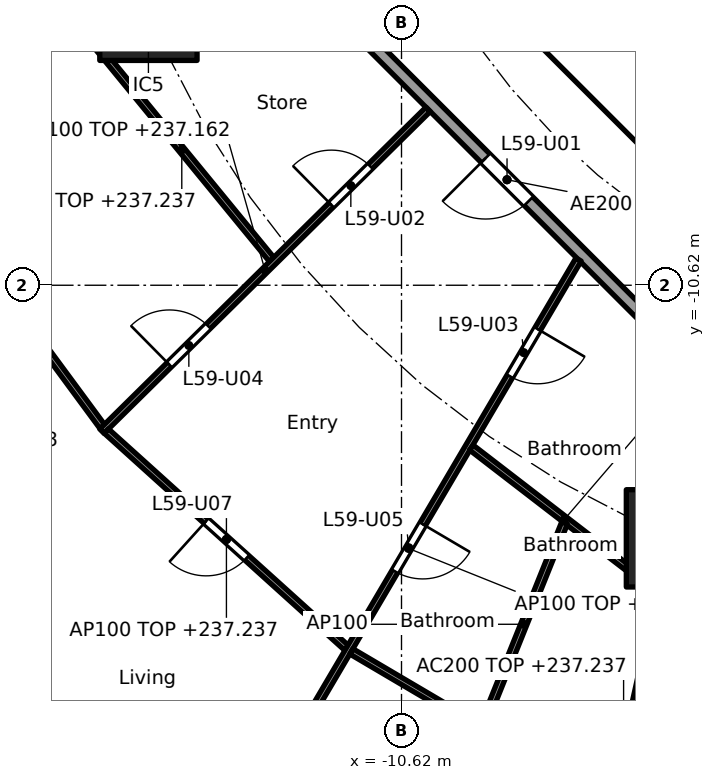
"""IFC4 building model, lengths in metres.
Left out: names, types, materials, properties, quantities, classifications, styles, units other than length and angle.
Written with IfcOpenShell. Run it as: python <this file> out.ifc"""

import sys

from ifc_helpers import new_model, si_unit, direction, frame, frame_2d, origin, origin_2d, place, context, subcontext, project, spatial, rectangle, extrude, element, fill, save


model = new_model("IFC4")
c1 = context("Model", 3, precision=1e-05, world=origin(), true_north=direction((0.0, 1.0)))
c2 = subcontext(c1, "Body", "Model", "MODEL_VIEW")
j1 = project(units=[si_unit("LENGTHUNIT", "METRE"), si_unit("PLANEANGLEUNIT", "RADIAN")], contexts=[c1])
p1 = place(None, origin())
s1 = spatial("IfcSite", under=j1, at=p1, CompositionType="ELEMENT")
p2 = place(p1, origin())
s2 = spatial("IfcBuilding", under=s1, at=p2, CompositionType="ELEMENT")
p3 = place(p2, frame((0.0, 0.0, 234.4)))
s3 = spatial("IfcBuildingStorey", under=s2, at=p3, CompositionType="ELEMENT", Elevation=234.4)
for number, where, z_axis, x_axis in (
    (1, (-14.782, -6.123, 0.0), (0.0, 0.0, 1.0), (1.0, 0.0, 0.0)),
    (2, (-6.123, -14.782, 0.0), (0.0, 0.0, 1.0), (1.0, 0.0, 0.0)),
):
    element("IfcColumn", number, at=place(p3, frame(where, z_axis=z_axis, x_axis=x_axis)), inside=s3, PredefinedType="COLUMN", context=c2, shape_type="SweptSolid", body=[
        extrude(rectangle(XDim=1.6, YDim=1.6, at=origin_2d()), origin(), (0.0, 0.0, 1.0), 3.7),
    ])
p4 = place(p3, frame((-9.988, -4.613, 0.0), z_axis=(0.0, 0.0, 1.0), x_axis=(0.707106781187, -0.707106781187, 0.0)))
e3 = element("IfcWall", 3, at=p4, inside=s3, PredefinedType="SHEAR", context=c2, shape_type="SweptSolid", body=[
    extrude(rectangle(XDim=7.602, YDim=0.6, at=frame_2d((3.801, 0.0))), origin(), (0.0, 0.0, 1.0), 3.44),
])
p5 = place(p4, frame((6.151, 0.0, 0.0)))
e4 = element("IfcOpeningElement", 4, at=p5, cuts=e3, PredefinedType="OPENING", context=c2, shape_type="SweptSolid", body=[
    extrude(rectangle(XDim=1.1, YDim=2.1, at=frame_2d((0.55, 1.05))), frame((0.0, 0.31, 0.0), z_axis=(0.0, -1.0, 0.0), x_axis=(1.0, 0.0, 0.0)), (0.0, 0.0, 1.0), 0.62),
])
p6 = place(p3, frame((-6.134, -14.831, 0.0), z_axis=(0.0, 0.0, 1.0), x_axis=(-0.217500172543, -0.976060282433, 0.0)))
e5 = element("IfcWall", 5, at=p6, inside=s3, PredefinedType="PARTITIONING", context=c2, shape_type="SweptSolid", body=[
    extrude(rectangle(XDim=7.668, YDim=0.2, at=frame_2d((3.834, 0.0))), origin(), (0.0, 0.0, 1.0), 2.837),
])
p7 = place(p3, frame((-12.635, -5.134, 0.0), z_axis=(0.0, 0.0, 1.0), x_axis=(0.707106781187, -0.707106781187, 0.0)))
e6 = element("IfcWall", 6, at=p7, inside=s3, PredefinedType="PARTITIONING", context=c2, shape_type="SweptSolid", body=[
    extrude(rectangle(XDim=10.609, YDim=0.2, at=frame_2d((5.305, 0.0))), origin(), (0.0, 0.0, 1.0), 3.44),
])
p8 = place(p7, frame((4.804, 0.0, 0.0)))
e7 = element("IfcOpeningElement", 7, at=p8, cuts=e6, PredefinedType="OPENING", context=c2, shape_type="SweptSolid", body=[
    extrude(rectangle(XDim=1.0, YDim=2.1, at=frame_2d((0.5, 1.05))), frame((0.0, 0.11, 0.0), z_axis=(0.0, -1.0, 0.0), x_axis=(1.0, 0.0, 0.0)), (0.0, 0.0, 1.0), 0.22),
])
p9 = place(p3, frame((-15.711, -6.593, 0.0), z_axis=(0.0, 0.0, 1.0), x_axis=(0.634058916642, -0.773284740718, 0.0)))
e8 = element("IfcWall", 8, at=p9, inside=s3, PredefinedType="PARTITIONING", context=c2, shape_type="SweptSolid", body=[
    extrude(rectangle(XDim=4.661, YDim=0.1, at=frame_2d((2.331, 0.0))), origin(), (0.0, 0.0, 1.0), 2.837),
])
p10 = place(p3, frame((-18.893, -8.395, 0.0), z_axis=(0.0, 0.0, 1.0), x_axis=(0.593212299255, -0.80504606577, 0.0)))
e9 = element("IfcWall", 9, at=p10, inside=s3, PredefinedType="PARTITIONING", context=c2, shape_type="SweptSolid", body=[
    extrude(rectangle(XDim=5.652, YDim=0.1, at=frame_2d((2.826, 0.0))), origin(), (0.0, 0.0, 1.0), 2.837),
])
p11 = place(p3, frame((-10.183, -7.728, 0.0), z_axis=(0.0, 0.0, 1.0), x_axis=(-0.711869910979, -0.702311348223, 0.0)))
e10 = element("IfcWall", 10, at=p11, inside=s3, PredefinedType="PARTITIONING", context=c2, shape_type="SweptSolid", body=[
    extrude(rectangle(XDim=7.535, YDim=0.1, at=frame_2d((3.767, 0.0))), origin(), (0.0, 0.0, 1.0), 2.762),
])
p12 = place(p11, frame((1.335, 0.0, 0.0)))
e11 = element("IfcOpeningElement", 11, at=p12, cuts=e10, PredefinedType="OPENING", context=c2, shape_type="SweptSolid", body=[
    extrude(rectangle(XDim=0.9, YDim=2.1, at=frame_2d((0.45, 1.05))), frame((0.0, 0.06, 0.0), z_axis=(0.0, -1.0, 0.0), x_axis=(1.0, 0.0, 0.0)), (0.0, 0.0, 1.0), 0.12),
])
p13 = place(p11, frame((5.077, 0.0, 0.0)))
e12 = element("IfcOpeningElement", 12, at=p13, cuts=e10, PredefinedType="OPENING", context=c2, shape_type="SweptSolid", body=[
    extrude(rectangle(XDim=0.9, YDim=2.1, at=frame_2d((0.45, 1.05))), frame((0.0, 0.06, 0.0), z_axis=(0.0, -1.0, 0.0), x_axis=(1.0, 0.0, 0.0)), (0.0, 0.0, 1.0), 0.12),
])
p14 = place(p3, frame((-15.474, -13.019, 0.0), z_axis=(0.0, 0.0, 1.0), x_axis=(0.742348572616, -0.670013878017, 0.0)))
e13 = element("IfcWall", 13, at=p14, inside=s3, PredefinedType="PARTITIONING", context=c2, shape_type="SweptSolid", body=[
    extrude(rectangle(XDim=5.319, YDim=0.1, at=frame_2d((2.66, 0.0))), origin(), (0.0, 0.0, 1.0), 2.837),
])
p15 = place(p14, frame((2.21, 0.0, 0.0)))
e14 = element("IfcOpeningElement", 14, at=p15, cuts=e13, PredefinedType="OPENING", context=c2, shape_type="SweptSolid", body=[
    extrude(rectangle(XDim=0.9, YDim=2.1, at=frame_2d((0.45, 1.05))), frame((0.0, 0.06, 0.0), z_axis=(0.0, -1.0, 0.0), x_axis=(1.0, 0.0, 0.0)), (0.0, 0.0, 1.0), 0.12),
])
p16 = place(p3, frame((-7.709, -10.198, 0.0), z_axis=(0.0, 0.0, 1.0), x_axis=(-0.507355901053, -0.8617366127, 0.0)))
e15 = element("IfcWall", 15, at=p16, inside=s3, PredefinedType="PARTITIONING", context=c2, shape_type="SweptSolid", body=[
    extrude(rectangle(XDim=11.025, YDim=0.1, at=frame_2d((5.512, 0.0))), origin(), (0.0, 0.0, 1.0), 2.762),
])
p17 = place(p16, frame((1.326, 0.0, 0.0)))
e16 = element("IfcOpeningElement", 16, at=p17, cuts=e15, PredefinedType="OPENING", context=c2, shape_type="SweptSolid", body=[
    extrude(rectangle(XDim=0.9, YDim=2.1, at=frame_2d((0.45, 1.05))), frame((0.0, 0.06, 0.0), z_axis=(0.0, -1.0, 0.0), x_axis=(1.0, 0.0, 0.0)), (0.0, 0.0, 1.0), 0.12),
])
p18 = place(p16, frame((5.05, 0.0, 0.0)))
e17 = element("IfcOpeningElement", 17, at=p18, cuts=e15, PredefinedType="OPENING", context=c2, shape_type="SweptSolid", body=[
    extrude(rectangle(XDim=0.9, YDim=2.1, at=frame_2d((0.45, 1.05))), frame((0.0, 0.06, 0.0), z_axis=(0.0, -1.0, 0.0), x_axis=(1.0, 0.0, 0.0)), (0.0, 0.0, 1.0), 0.12),
])
p19 = place(p16, frame((8.787, 0.0, 0.0)))
e18 = element("IfcOpeningElement", 18, at=p19, cuts=e15, PredefinedType="OPENING", context=c2, shape_type="SweptSolid", body=[
    extrude(rectangle(XDim=0.9, YDim=2.1, at=frame_2d((0.45, 1.05))), frame((0.0, 0.06, 0.0), z_axis=(0.0, -1.0, 0.0), x_axis=(1.0, 0.0, 0.0)), (0.0, 0.0, 1.0), 0.12),
])
p20 = place(p3, frame((-9.471, -13.289, 0.0), z_axis=(0.0, 0.0, 1.0), x_axis=(0.792227074489, -0.610226402614, 0.0)))
e19 = element("IfcWall", 19, at=p20, inside=s3, PredefinedType="PARTITIONING", context=c2, shape_type="SweptSolid", body=[
    extrude(rectangle(XDim=3.866, YDim=0.1, at=frame_2d((1.933, 0.0))), origin(), (0.0, 0.0, 1.0), 2.837),
])
p21 = place(p3, frame((-11.445, -16.641, 0.0), z_axis=(0.0, 0.0, 1.0), x_axis=(0.861568986754, -0.507640503766, 0.0)))
e20 = element("IfcWall", 20, at=p21, inside=s3, PredefinedType="PARTITIONING", context=c2, shape_type="SweptSolid", body=[
    extrude(rectangle(XDim=4.935, YDim=0.1, at=frame_2d((2.467, 0.0))), origin(), (0.0, 0.0, 1.0), 2.837),
])
p22 = place(p21, frame((3.264, 0.0, 0.0)))
e21 = element("IfcOpeningElement", 21, at=p22, cuts=e20, PredefinedType="OPENING", context=c2, shape_type="SweptSolid", body=[
    extrude(rectangle(XDim=0.9, YDim=2.1, at=frame_2d((0.45, 1.05))), frame((0.0, 0.06, 0.0), z_axis=(0.0, -1.0, 0.0), x_axis=(1.0, 0.0, 0.0)), (0.0, 0.0, 1.0), 0.12),
])
p23 = place(p3, frame((-7.939, -14.531, 0.0), z_axis=(0.0, 0.0, 1.0), x_axis=(-0.373254758443, -0.927728885666, 0.0)))
e22 = element("IfcWall", 22, at=p23, inside=s3, PredefinedType="PARTITIONING", context=c2, shape_type="SweptSolid", body=[
    extrude(rectangle(XDim=3.589, YDim=0.1, at=frame_2d((1.794, 0.0))), origin(), (0.0, 0.0, 1.0), 3.44),
])
p24 = place(p8, frame((1.0, 0.0, 0.0), x_axis=(-1.0, 0.0, 0.0)))
e23 = element("IfcDoor", 23, at=p24, inside=s3, OperationType="SINGLE_SWING_RIGHT", PredefinedType="DOOR", context=c2, shape_type="SweptSolid", body=[
    extrude(rectangle(XDim=1.0, YDim=2.1, at=frame_2d((0.5, 1.05))), frame((0.0, 0.025, 0.0), z_axis=(0.0, -1.0, 0.0), x_axis=(1.0, 0.0, 0.0)), (0.0, 0.0, 1.0), 0.05),
])
fill(e7, e23)
p25 = place(p12, frame((0.9, 0.0, 0.0), x_axis=(-1.0, 0.0, 0.0)))
e24 = element("IfcDoor", 24, at=p25, inside=s3, OperationType="SINGLE_SWING_LEFT", PredefinedType="DOOR", context=c2, shape_type="SweptSolid", body=[
    extrude(rectangle(XDim=0.9, YDim=2.1, at=frame_2d((0.45, 1.05))), frame((0.0, 0.025, 0.0), z_axis=(0.0, -1.0, 0.0), x_axis=(1.0, 0.0, 0.0)), (0.0, 0.0, 1.0), 0.05),
])
fill(e11, e24)
p26 = place(p17, origin())
e25 = element("IfcDoor", 25, at=p26, inside=s3, OperationType="SINGLE_SWING_LEFT", PredefinedType="DOOR", context=c2, shape_type="SweptSolid", body=[
    extrude(rectangle(XDim=0.9, YDim=2.1, at=frame_2d((0.45, 1.05))), frame((0.0, 0.025, 0.0), z_axis=(0.0, -1.0, 0.0), x_axis=(1.0, 0.0, 0.0)), (0.0, 0.0, 1.0), 0.05),
])
fill(e16, e25)
p27 = place(p13, frame((0.9, 0.0, 0.0), x_axis=(-1.0, 0.0, 0.0)))
e26 = element("IfcDoor", 26, at=p27, inside=s3, OperationType="SINGLE_SWING_LEFT", PredefinedType="DOOR", context=c2, shape_type="SweptSolid", body=[
    extrude(rectangle(XDim=0.9, YDim=2.1, at=frame_2d((0.45, 1.05))), frame((0.0, 0.025, 0.0), z_axis=(0.0, -1.0, 0.0), x_axis=(1.0, 0.0, 0.0)), (0.0, 0.0, 1.0), 0.05),
])
fill(e12, e26)
p28 = place(p18, origin())
e27 = element("IfcDoor", 27, at=p28, inside=s3, OperationType="SINGLE_SWING_LEFT", PredefinedType="DOOR", context=c2, shape_type="SweptSolid", body=[
    extrude(rectangle(XDim=0.9, YDim=2.1, at=frame_2d((0.45, 1.05))), frame((0.0, 0.025, 0.0), z_axis=(0.0, -1.0, 0.0), x_axis=(1.0, 0.0, 0.0)), (0.0, 0.0, 1.0), 0.05),
])
fill(e17, e27)
p29 = place(p15, frame((0.9, 0.0, 0.0), x_axis=(-1.0, 0.0, 0.0)))
e28 = element("IfcDoor", 28, at=p29, inside=s3, OperationType="SINGLE_SWING_RIGHT", PredefinedType="DOOR", context=c2, shape_type="SweptSolid", body=[
    extrude(rectangle(XDim=0.9, YDim=2.1, at=frame_2d((0.45, 1.05))), frame((0.0, 0.025, 0.0), z_axis=(0.0, -1.0, 0.0), x_axis=(1.0, 0.0, 0.0)), (0.0, 0.0, 1.0), 0.05),
])
fill(e14, e28)
save(model, sys.argv[1])
